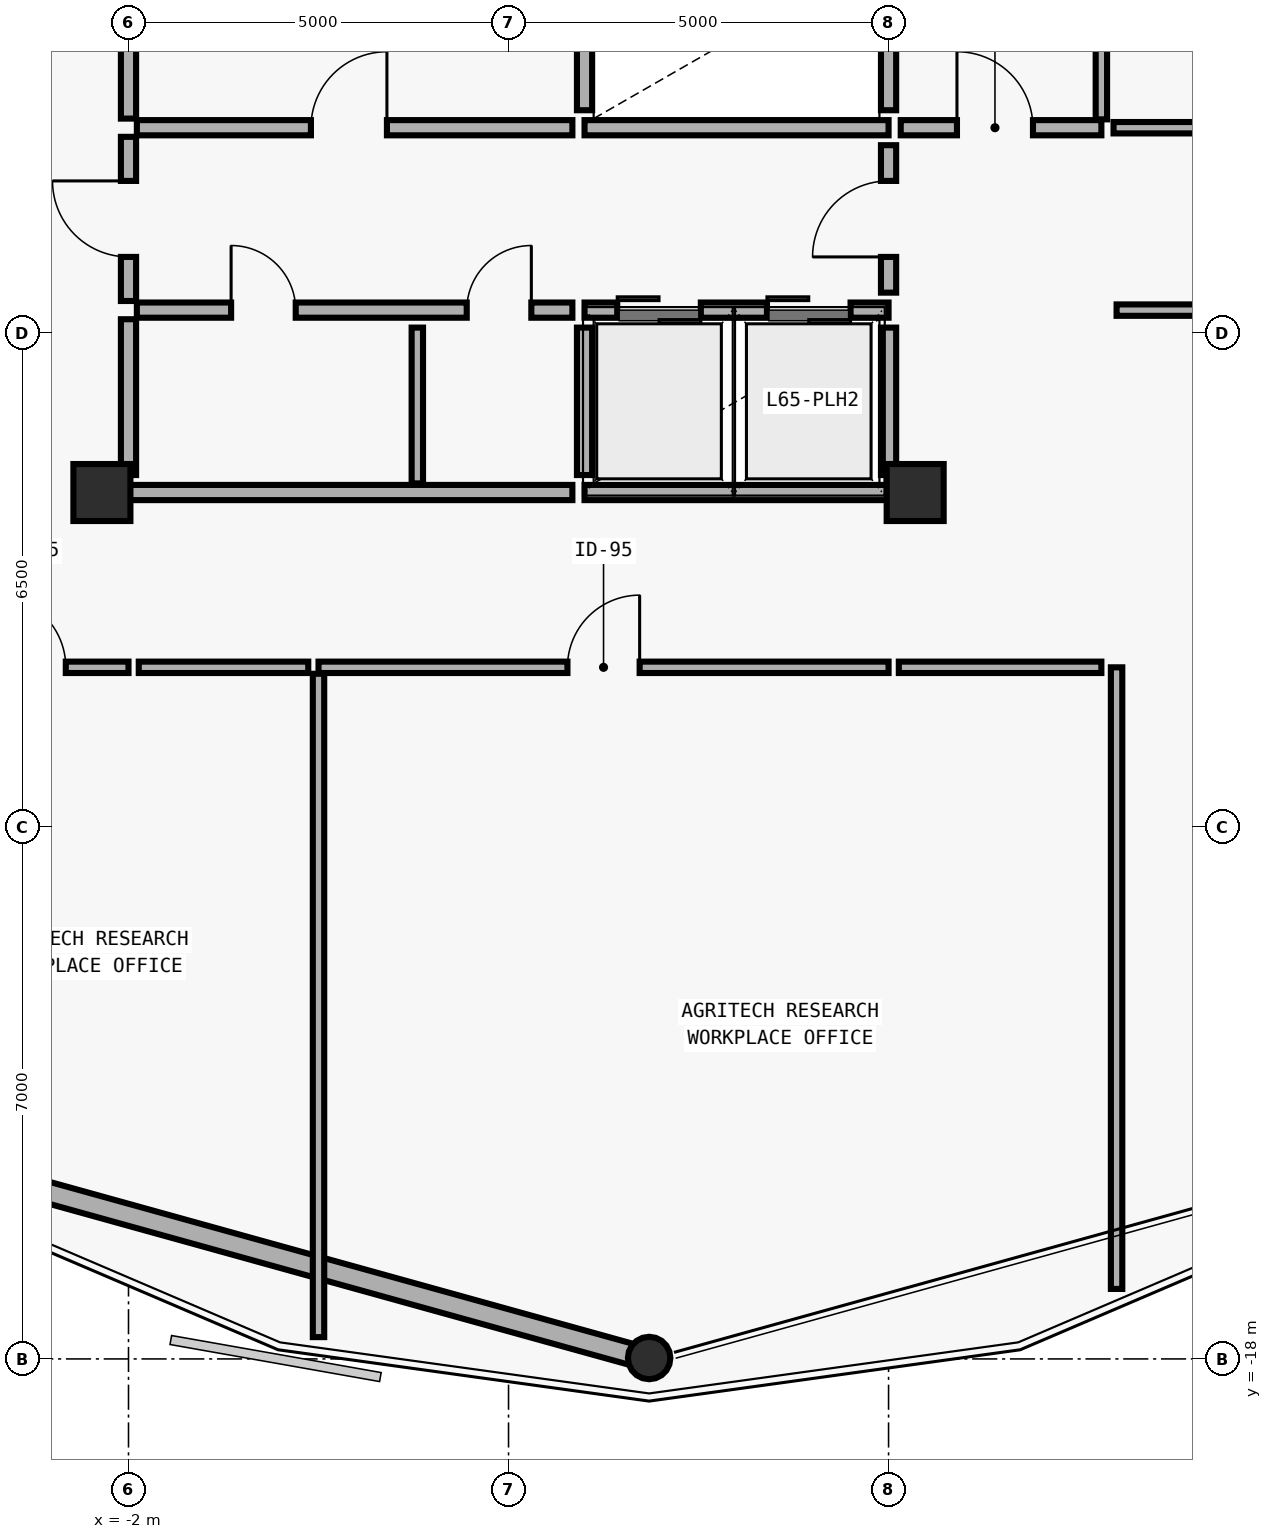
"""IFC4 building model, lengths in metres.
Left out: names, types, materials, properties, quantities, classifications, styles, units other than length and angle.
Written with IfcOpenShell. Run it as: python <this file> out.ifc"""

import sys

from ifc_helpers import new_model, si_unit, direction, frame, frame_2d, origin, origin_2d, place, context, subcontext, project, spatial, rectangle, hollow_circle, extrude, element, fill, save


model = new_model("IFC4")
c1 = context("Model", 3, precision=1e-05, world=origin(), true_north=direction((0.0, 1.0)))
c2 = subcontext(c1, "Body", "Model", "MODEL_VIEW")
j1 = project(units=[si_unit("LENGTHUNIT", "METRE"), si_unit("PLANEANGLEUNIT", "RADIAN")], contexts=[c1])
p1 = place(None, origin())
s1 = spatial("IfcSite", under=j1, at=p1, CompositionType="ELEMENT")
p2 = place(p1, origin())
s2 = spatial("IfcBuilding", under=s1, at=p2, CompositionType="ELEMENT")
p3 = place(p2, frame((0.0, 0.0, 256.2)))
s3 = spatial("IfcBuildingStorey", under=s2, at=p3, CompositionType="ELEMENT", Elevation=256.2)
for number, where, z_axis, x_axis in (
    (1, (-2.35, -6.6, 0.0), (0.0, 0.0, 1.0), (1.0, 0.0, 0.0)),
    (2, (8.35, -6.6, 0.0), (0.0, 0.0, 1.0), (1.0, 0.0, 0.0)),
):
    element("IfcColumn", number, at=place(p3, frame(where, z_axis=z_axis, x_axis=x_axis)), inside=s3, PredefinedType="COLUMN", context=c2, shape_type="SweptSolid", body=[
        extrude(rectangle(XDim=0.75, YDim=0.75, at=origin_2d()), origin(), (0.0, 0.0, 1.0), 3.575),
    ])
p4 = place(p3, frame((4.85, -18.005, 0.0), z_axis=(0.0, 0.00949216266, 0.999954948409), x_axis=(-1.0, 0.0, 0.0)))
e3 = element("IfcColumn", 3, at=p4, inside=s3, PredefinedType="COLUMN", context=c2, shape_type="SweptSolid", body=[
    extrude(hollow_circle(Radius=0.28, WallThickness=0.02, at=origin_2d()), origin(), (0.0, 0.0, 1.0), 3.575),
])
p5 = place(p3, frame((4.624, -17.942, 0.0), z_axis=(0.0, 0.0, 1.0), x_axis=(-0.963573148657, 0.267444923653, 0.0)))
e4 = element("IfcWall", 4, at=p5, inside=s3, PredefinedType="SOLIDWALL", context=c2, shape_type="SweptSolid", body=[
    extrude(rectangle(XDim=8.988, YDim=0.28, at=frame_2d((4.494, 0.0))), origin(), (0.0, 0.0, 1.0), 2.97),
])
p6 = place(p3, frame((4.0, -1.8, 0.0), z_axis=(0.0, 0.0, 1.0), x_axis=(1.0, 0.0, 0.0)))
e5 = element("IfcWall", 5, at=p6, inside=s3, PredefinedType="SOLIDWALL", context=c2, shape_type="SweptSolid", body=[
    extrude(rectangle(XDim=4.0, YDim=0.2, at=frame_2d((2.0, 0.0))), origin(), (0.0, 0.0, 1.0), 3.36),
])
p7 = place(p3, frame((4.0, -1.57, 0.0), z_axis=(0.0, 0.0, 1.0), x_axis=(0.0, 1.0, 0.0)))
e6 = element("IfcWall", 6, at=p7, inside=s3, PredefinedType="SOLIDWALL", context=c2, shape_type="SweptSolid", body=[
    extrude(rectangle(XDim=1.94, YDim=0.2, at=frame_2d((0.97, 0.0))), origin(), (0.0, 0.0, 1.0), 3.36),
])
p8 = place(p3, frame((8.0, -1.57, 0.0), z_axis=(0.0, 0.0, 1.0), x_axis=(0.0, 1.0, 0.0)))
e7 = element("IfcWall", 7, at=p8, inside=s3, PredefinedType="SOLIDWALL", context=c2, shape_type="SweptSolid", body=[
    extrude(rectangle(XDim=2.05, YDim=0.2, at=frame_2d((1.025, 0.0))), origin(), (0.0, 0.0, 1.0), 3.072),
])
p9 = place(p3, frame((4.0, -4.2, 0.0), z_axis=(0.0, 0.0, 1.0), x_axis=(1.0, 0.0, 0.0)))
e8 = element("IfcWall", 8, at=p9, inside=s3, PredefinedType="SOLIDWALL", context=c2, shape_type="SweptSolid", body=[
    extrude(rectangle(XDim=4.0, YDim=0.2, at=frame_2d((2.0, 0.0))), origin(), (0.0, 0.0, 1.0), 3.36),
])
p10 = place(p9, frame((0.43, 0.0, 0.0)))
e9 = element("IfcOpeningElement", 9, at=p10, cuts=e8, PredefinedType="OPENING", context=c2, shape_type="SweptSolid", body=[
    extrude(rectangle(XDim=1.1, YDim=2.2, at=frame_2d((0.55, 1.1))), frame((0.0, 0.11, 0.0), z_axis=(0.0, -1.0, 0.0), x_axis=(1.0, 0.0, 0.0)), (0.0, 0.0, 1.0), 0.22),
])
p11 = place(p9, frame((2.4, 0.0, 0.0)))
e10 = element("IfcOpeningElement", 10, at=p11, cuts=e8, PredefinedType="OPENING", context=c2, shape_type="SweptSolid", body=[
    extrude(rectangle(XDim=1.1, YDim=2.2, at=frame_2d((0.55, 1.1))), frame((0.0, 0.11, 0.0), z_axis=(0.0, -1.0, 0.0), x_axis=(1.0, 0.0, 0.0)), (0.0, 0.0, 1.0), 0.22),
])
p12 = place(p3, frame((4.0, -6.6, 0.0), z_axis=(0.0, 0.0, 1.0), x_axis=(1.0, 0.0, 0.0)))
e11 = element("IfcWall", 11, at=p12, inside=s3, PredefinedType="SOLIDWALL", context=c2, shape_type="SweptSolid", body=[
    extrude(rectangle(XDim=4.0, YDim=0.2, at=frame_2d((2.0, 0.0))), origin(), (0.0, 0.0, 1.0), 3.072),
])
p13 = place(p3, frame((4.0, -6.37, 0.0), z_axis=(0.0, 0.0, 1.0), x_axis=(0.0, 1.0, 0.0)))
e12 = element("IfcWall", 12, at=p13, inside=s3, PredefinedType="SOLIDWALL", context=c2, shape_type="SweptSolid", body=[
    extrude(rectangle(XDim=1.94, YDim=0.2, at=frame_2d((0.97, 0.0))), origin(), (0.0, 0.0, 1.0), 3.36),
])
p14 = place(p3, frame((8.0, -6.37, 0.0), z_axis=(0.0, 0.0, 1.0), x_axis=(0.0, 1.0, 0.0)))
e13 = element("IfcWall", 13, at=p14, inside=s3, PredefinedType="SOLIDWALL", context=c2, shape_type="SweptSolid", body=[
    extrude(rectangle(XDim=1.94, YDim=0.2, at=frame_2d((0.97, 0.0))), origin(), (0.0, 0.0, 1.0), 3.072),
])
p15 = place(p3, frame((-2.0, -4.08, 0.0), z_axis=(0.0, 0.0, 1.0), x_axis=(0.0, 1.0, 0.0)))
e14 = element("IfcWall", 14, at=p15, inside=s3, PredefinedType="MOVABLE", context=c2, shape_type="SweptSolid", body=[
    extrude(rectangle(XDim=2.16, YDim=0.2, at=frame_2d((1.08, 0.0))), origin(), (0.0, 0.0, 1.0), 3.072),
])
p16 = place(p15, frame((0.58, 0.0, 0.0)))
e15 = element("IfcOpeningElement", 15, at=p16, cuts=e14, PredefinedType="OPENING", context=c2, shape_type="SweptSolid", body=[
    extrude(rectangle(XDim=1.0, YDim=2.1, at=frame_2d((0.5, 1.05))), frame((0.0, 0.11, 0.0), z_axis=(0.0, -1.0, 0.0), x_axis=(1.0, 0.0, 0.0)), (0.0, 0.0, 1.0), 0.22),
])
p17 = place(p3, frame((8.0, -3.97, 0.0), z_axis=(0.0, 0.0, 1.0), x_axis=(0.0, 1.0, 0.0)))
e16 = element("IfcWall", 16, at=p17, inside=s3, PredefinedType="MOVABLE", context=c2, shape_type="SweptSolid", body=[
    extrude(rectangle(XDim=1.94, YDim=0.2, at=frame_2d((0.97, 0.0))), origin(), (0.0, 0.0, 1.0), 3.072),
])
p18 = place(p17, frame((0.47, 0.0, 0.0)))
e17 = element("IfcOpeningElement", 17, at=p18, cuts=e16, PredefinedType="OPENING", context=c2, shape_type="SweptSolid", body=[
    extrude(rectangle(XDim=1.0, YDim=2.1, at=frame_2d((0.5, 1.05))), frame((0.0, 0.11, 0.0), z_axis=(0.0, -1.0, 0.0), x_axis=(1.0, 0.0, 0.0)), (0.0, 0.0, 1.0), 0.22),
])
p19 = place(p3, frame((-1.89, -1.8, 0.0), z_axis=(0.0, 0.0, 1.0), x_axis=(1.0, 0.0, 0.0)))
e18 = element("IfcWall", 18, at=p19, inside=s3, PredefinedType="MOVABLE", context=c2, shape_type="SweptSolid", body=[
    extrude(rectangle(XDim=5.73, YDim=0.2, at=frame_2d((2.865, 0.0))), origin(), (0.0, 0.0, 1.0), 3.36),
])
p20 = place(p19, frame((2.29, 0.0, 0.0)))
e19 = element("IfcOpeningElement", 19, at=p20, cuts=e18, PredefinedType="OPENING", context=c2, shape_type="SweptSolid", body=[
    extrude(rectangle(XDim=1.0, YDim=2.1, at=frame_2d((0.5, 1.05))), frame((0.0, 0.11, 0.0), z_axis=(0.0, -1.0, 0.0), x_axis=(1.0, 0.0, 0.0)), (0.0, 0.0, 1.0), 0.22),
])
p21 = place(p3, frame((-1.89, -4.2, 0.0), z_axis=(0.0, 0.0, 1.0), x_axis=(1.0, 0.0, 0.0)))
e20 = element("IfcWall", 20, at=p21, inside=s3, PredefinedType="MOVABLE", context=c2, shape_type="SweptSolid", body=[
    extrude(rectangle(XDim=5.73, YDim=0.2, at=frame_2d((2.865, 0.0))), origin(), (0.0, 0.0, 1.0), 3.36),
])
p22 = place(p21, frame((1.24, 0.0, 0.0)))
e21 = element("IfcOpeningElement", 21, at=p22, cuts=e20, PredefinedType="OPENING", context=c2, shape_type="SweptSolid", body=[
    extrude(rectangle(XDim=0.85, YDim=2.1, at=frame_2d((0.425, 1.05))), frame((0.0, 0.11, 0.0), z_axis=(0.0, -1.0, 0.0), x_axis=(1.0, 0.0, 0.0)), (0.0, 0.0, 1.0), 0.22),
])
p23 = place(p21, frame((4.34, 0.0, 0.0)))
e22 = element("IfcOpeningElement", 22, at=p23, cuts=e20, PredefinedType="OPENING", context=c2, shape_type="SweptSolid", body=[
    extrude(rectangle(XDim=0.85, YDim=2.1, at=frame_2d((0.425, 1.05))), frame((0.0, 0.11, 0.0), z_axis=(0.0, -1.0, 0.0), x_axis=(1.0, 0.0, 0.0)), (0.0, 0.0, 1.0), 0.22),
])
p24 = place(p3, frame((8.16, -1.8, 0.0), z_axis=(0.0, 0.0, 1.0), x_axis=(1.0, 0.0, 0.0)))
e23 = element("IfcWall", 23, at=p24, inside=s3, PredefinedType="MOVABLE", context=c2, shape_type="SweptSolid", body=[
    extrude(rectangle(XDim=2.64, YDim=0.2, at=frame_2d((1.32, 0.0))), origin(), (0.0, 0.0, 1.0), 3.36),
])
p25 = place(p24, frame((0.74, 0.0, 0.0)))
e24 = element("IfcOpeningElement", 24, at=p25, cuts=e23, PredefinedType="OPENING", context=c2, shape_type="SweptSolid", body=[
    extrude(rectangle(XDim=1.0, YDim=2.1, at=frame_2d((0.5, 1.05))), frame((0.0, 0.11, 0.0), z_axis=(0.0, -1.0, 0.0), x_axis=(1.0, 0.0, 0.0)), (0.0, 0.0, 1.0), 0.22),
])
p26 = place(p3, frame((-4.6, -8.9, 0.0), z_axis=(0.0, 0.0, 1.0), x_axis=(1.0, 0.0, 0.0)))
e25 = element("IfcWall", 25, at=p26, inside=s3, PredefinedType="PARTITIONING", context=c2, shape_type="SweptSolid", body=[
    extrude(rectangle(XDim=2.6, YDim=0.15, at=frame_2d((1.3, 0.0))), origin(), (0.0, 0.0, 1.0), 3.36),
])
p27 = place(p26, frame((0.825, 0.0, 0.0)))
e26 = element("IfcOpeningElement", 26, at=p27, cuts=e25, PredefinedType="OPENING", context=c2, shape_type="SweptSolid", body=[
    extrude(rectangle(XDim=0.95, YDim=2.1, at=frame_2d((0.475, 1.05))), frame((0.0, 0.085, 0.0), z_axis=(0.0, -1.0, 0.0), x_axis=(1.0, 0.0, 0.0)), (0.0, 0.0, 1.0), 0.17),
])
p28 = place(p3, frame((0.5, -8.9, 0.0), z_axis=(0.0, 0.0, 1.0), x_axis=(1.0, 0.0, 0.0)))
e27 = element("IfcWall", 27, at=p28, inside=s3, PredefinedType="PARTITIONING", context=c2, shape_type="SweptSolid", body=[
    extrude(rectangle(XDim=7.5, YDim=0.15, at=frame_2d((3.75, 0.0))), origin(), (0.0, 0.0, 1.0), 3.36),
])
p29 = place(p28, frame((3.275, 0.0, 0.0)))
e28 = element("IfcOpeningElement", 28, at=p29, cuts=e27, PredefinedType="OPENING", context=c2, shape_type="SweptSolid", body=[
    extrude(rectangle(XDim=0.95, YDim=2.1, at=frame_2d((0.475, 1.05))), frame((0.0, 0.085, 0.0), z_axis=(0.0, -1.0, 0.0), x_axis=(1.0, 0.0, 0.0)), (0.0, 0.0, 1.0), 0.17),
])
p30 = place(p3, frame((11.0, -4.2, 0.0), z_axis=(0.0, 0.0, 1.0), x_axis=(1.0, 0.0, 0.0)))
e29 = element("IfcWall", 29, at=p30, inside=s3, PredefinedType="PARTITIONING", context=c2, shape_type="SweptSolid", body=[
    extrude(rectangle(XDim=7.5, YDim=0.15, at=frame_2d((3.75, 0.0))), origin(), (0.0, 0.0, 1.0), 3.36),
])
p31 = place(p30, frame((3.275, 0.0, 0.0)))
e30 = element("IfcOpeningElement", 30, at=p31, cuts=e29, PredefinedType="OPENING", context=c2, shape_type="SweptSolid", body=[
    extrude(rectangle(XDim=0.95, YDim=2.1, at=frame_2d((0.475, 1.05))), frame((0.0, 0.085, 0.0), z_axis=(0.0, -1.0, 0.0), x_axis=(1.0, 0.0, 0.0)), (0.0, 0.0, 1.0), 0.17),
])
p32 = place(p3, frame((10.8, -1.69, 0.0), z_axis=(0.0, 0.0, 1.0), x_axis=(0.0, 1.0, 0.0)))
e31 = element("IfcWall", 31, at=p32, inside=s3, PredefinedType="PARTITIONING", context=c2, shape_type="SweptSolid", body=[
    extrude(rectangle(XDim=8.69, YDim=0.15, at=frame_2d((4.345, 0.0))), origin(), (0.0, 0.0, 1.0), 3.36),
])
p33 = place(p32, frame((3.815, 0.0, 0.0)))
e32 = element("IfcOpeningElement", 32, at=p33, cuts=e31, PredefinedType="OPENING", context=c2, shape_type="SweptSolid", body=[
    extrude(rectangle(XDim=0.95, YDim=2.1, at=frame_2d((0.475, 1.05))), frame((0.0, 0.085, 0.0), z_axis=(0.0, -1.0, 0.0), x_axis=(1.0, 0.0, 0.0)), (0.0, 0.0, 1.0), 0.17),
])
p34 = place(p3, frame((-2.0, -1.68, 0.0), z_axis=(0.0, 0.0, 1.0), x_axis=(0.0, 1.0, 0.0)))
e33 = element("IfcWall", 33, at=p34, inside=s3, PredefinedType="MOVABLE", context=c2, shape_type="SweptSolid", body=[
    extrude(rectangle(XDim=2.16, YDim=0.2, at=frame_2d((1.08, 0.0))), origin(), (0.0, 0.0, 1.0), 3.072),
])
p35 = place(p3, frame((1.8, -6.48, 0.0), z_axis=(0.0, 0.0, 1.0), x_axis=(0.0, 1.0, 0.0)))
e34 = element("IfcWall", 34, at=p35, inside=s3, PredefinedType="PARTITIONING", context=c2, shape_type="SweptSolid", body=[
    extrude(rectangle(XDim=2.05, YDim=0.15, at=frame_2d((1.025, 0.0))), origin(), (0.0, 0.0, 1.0), 3.36),
])
p36 = place(p3, frame((-2.0, -6.6, 0.0), z_axis=(0.0, 0.0, 1.0), x_axis=(1.0, 0.0, 0.0)))
e35 = element("IfcWall", 35, at=p36, inside=s3, PredefinedType="MOVABLE", context=c2, shape_type="SweptSolid", body=[
    extrude(rectangle(XDim=5.84, YDim=0.2, at=frame_2d((2.92, 0.0))), origin(), (0.0, 0.0, 1.0), 3.072),
])
p37 = place(p3, frame((-2.0, -6.37, 0.0), z_axis=(0.0, 0.0, 1.0), x_axis=(0.0, 1.0, 0.0)))
e36 = element("IfcWall", 36, at=p37, inside=s3, PredefinedType="MOVABLE", context=c2, shape_type="SweptSolid", body=[
    extrude(rectangle(XDim=2.05, YDim=0.2, at=frame_2d((1.025, 0.0))), origin(), (0.0, 0.0, 1.0), 3.072),
])
p38 = place(p3, frame((-1.865, -8.9, 0.0), z_axis=(0.0, 0.0, 1.0), x_axis=(1.0, 0.0, 0.0)))
e37 = element("IfcWall", 37, at=p38, inside=s3, PredefinedType="PARTITIONING", context=c2, shape_type="SweptSolid", body=[
    extrude(rectangle(XDim=2.23, YDim=0.15, at=frame_2d((1.115, 0.0))), origin(), (0.0, 0.0, 1.0), 3.36),
])
p39 = place(p3, frame((0.5, -8.985, 0.0), z_axis=(0.0, 0.0, 1.0), x_axis=(0.0, -1.0, 0.0)))
e38 = element("IfcWall", 38, at=p39, inside=s3, PredefinedType="PARTITIONING", context=c2, shape_type="SweptSolid", body=[
    extrude(rectangle(XDim=8.728, YDim=0.15, at=frame_2d((4.364, 0.0))), origin(), (0.0, 0.0, 1.0), 3.36),
])
p40 = place(p3, frame((8.135, -8.9, 0.0), z_axis=(0.0, 0.0, 1.0), x_axis=(1.0, 0.0, 0.0)))
e39 = element("IfcWall", 39, at=p40, inside=s3, PredefinedType="PARTITIONING", context=c2, shape_type="SweptSolid", body=[
    extrude(rectangle(XDim=2.665, YDim=0.15, at=frame_2d((1.333, 0.0))), origin(), (0.0, 0.0, 1.0), 3.36),
])
p41 = place(p3, frame((11.0, -8.9, 0.0), z_axis=(0.0, 0.0, 1.0), x_axis=(0.0, -1.0, 0.0)))
e40 = element("IfcWall", 40, at=p41, inside=s3, PredefinedType="PARTITIONING", context=c2, shape_type="SweptSolid", body=[
    extrude(rectangle(XDim=8.179, YDim=0.15, at=frame_2d((4.09, 0.0))), origin(), (0.0, 0.0, 1.0), 3.36),
])
p42 = place(p3, frame((18.415, -1.8, 0.0), z_axis=(0.0, 0.0, 1.0), x_axis=(-1.0, 0.0, 0.0)))
e41 = element("IfcWall", 41, at=p42, inside=s3, PredefinedType="PARTITIONING", context=c2, shape_type="SweptSolid", body=[
    extrude(rectangle(XDim=7.455, YDim=0.15, at=frame_2d((3.728, 0.0))), origin(), (0.0, 0.0, 1.0), 3.36),
])
p43 = place(p16, origin())
e42 = element("IfcDoor", 42, at=p43, inside=s3, OperationType="SINGLE_SWING_RIGHT", PredefinedType="DOOR", context=c2, shape_type="SweptSolid", body=[
    extrude(rectangle(XDim=1.0, YDim=2.1, at=frame_2d((0.5, 1.05))), frame((0.0, 0.025, 0.0), z_axis=(0.0, -1.0, 0.0), x_axis=(1.0, 0.0, 0.0)), (0.0, 0.0, 1.0), 0.05),
])
fill(e15, e42)
p44 = place(p18, origin())
e43 = element("IfcDoor", 43, at=p44, inside=s3, OperationType="SINGLE_SWING_LEFT", PredefinedType="DOOR", context=c2, shape_type="SweptSolid", body=[
    extrude(rectangle(XDim=1.0, YDim=2.1, at=frame_2d((0.5, 1.05))), frame((0.0, 0.025, 0.0), z_axis=(0.0, -1.0, 0.0), x_axis=(1.0, 0.0, 0.0)), (0.0, 0.0, 1.0), 0.05),
])
fill(e17, e43)
p45 = place(p20, origin())
e44 = element("IfcDoor", 44, at=p45, inside=s3, OperationType="SINGLE_SWING_RIGHT", PredefinedType="DOOR", context=c2, shape_type="SweptSolid", body=[
    extrude(rectangle(XDim=1.0, YDim=2.1, at=frame_2d((0.5, 1.05))), frame((0.0, 0.025, 0.0), z_axis=(0.0, -1.0, 0.0), x_axis=(1.0, 0.0, 0.0)), (0.0, 0.0, 1.0), 0.05),
])
fill(e19, e44)
p46 = place(p22, origin())
e45 = element("IfcDoor", 45, at=p46, inside=s3, OperationType="SINGLE_SWING_LEFT", PredefinedType="DOOR", context=c2, shape_type="SweptSolid", body=[
    extrude(rectangle(XDim=0.85, YDim=2.1, at=frame_2d((0.425, 1.05))), frame((0.0, 0.025, 0.0), z_axis=(0.0, -1.0, 0.0), x_axis=(1.0, 0.0, 0.0)), (0.0, 0.0, 1.0), 0.05),
])
fill(e21, e45)
p47 = place(p23, origin())
e46 = element("IfcDoor", 46, at=p47, inside=s3, OperationType="SINGLE_SWING_RIGHT", PredefinedType="DOOR", context=c2, shape_type="SweptSolid", body=[
    extrude(rectangle(XDim=0.85, YDim=2.1, at=frame_2d((0.425, 1.05))), frame((0.0, 0.025, 0.0), z_axis=(0.0, -1.0, 0.0), x_axis=(1.0, 0.0, 0.0)), (0.0, 0.0, 1.0), 0.05),
])
fill(e22, e46)
p48 = place(p25, origin())
e47 = element("IfcDoor", 47, at=p48, inside=s3, OperationType="SINGLE_SWING_LEFT", PredefinedType="DOOR", context=c2, shape_type="SweptSolid", body=[
    extrude(rectangle(XDim=1.0, YDim=2.1, at=frame_2d((0.5, 1.05))), frame((0.0, 0.025, 0.0), z_axis=(0.0, -1.0, 0.0), x_axis=(1.0, 0.0, 0.0)), (0.0, 0.0, 1.0), 0.05),
])
fill(e24, e47)
p49 = place(p27, origin())
e48 = element("IfcDoor", 48, at=p49, inside=s3, OperationType="SINGLE_SWING_LEFT", PredefinedType="DOOR", context=c2, shape_type="SweptSolid", body=[
    extrude(rectangle(XDim=0.95, YDim=2.1, at=frame_2d((0.475, 1.05))), frame((0.0, 0.025, 0.0), z_axis=(0.0, -1.0, 0.0), x_axis=(1.0, 0.0, 0.0)), (0.0, 0.0, 1.0), 0.05),
])
fill(e26, e48)
p50 = place(p29, origin())
e49 = element("IfcDoor", 49, at=p50, inside=s3, OperationType="SINGLE_SWING_RIGHT", PredefinedType="DOOR", context=c2, shape_type="SweptSolid", body=[
    extrude(rectangle(XDim=0.95, YDim=2.1, at=frame_2d((0.475, 1.05))), frame((0.0, 0.025, 0.0), z_axis=(0.0, -1.0, 0.0), x_axis=(1.0, 0.0, 0.0)), (0.0, 0.0, 1.0), 0.05),
])
fill(e28, e49)
p51 = place(p10, origin())
e50 = element("IfcDoor", 50, at=p51, inside=s3, OperationType="DOUBLE_DOOR_SLIDING", PredefinedType="DOOR", context=c2, shape_type="SweptSolid", body=[
    extrude(rectangle(XDim=1.1, YDim=2.2, at=frame_2d((0.55, 1.1))), frame((0.0, 0.025, 0.0), z_axis=(0.0, -1.0, 0.0), x_axis=(1.0, 0.0, 0.0)), (0.0, 0.0, 1.0), 0.05),
])
fill(e9, e50)
p52 = place(p11, origin())
e51 = element("IfcDoor", 51, at=p52, inside=s3, OperationType="DOUBLE_DOOR_SLIDING", PredefinedType="DOOR", context=c2, shape_type="SweptSolid", body=[
    extrude(rectangle(XDim=1.1, YDim=2.2, at=frame_2d((0.55, 1.1))), frame((0.0, 0.025, 0.0), z_axis=(0.0, -1.0, 0.0), x_axis=(1.0, 0.0, 0.0)), (0.0, 0.0, 1.0), 0.05),
])
fill(e10, e51)
save(model, sys.argv[1])
